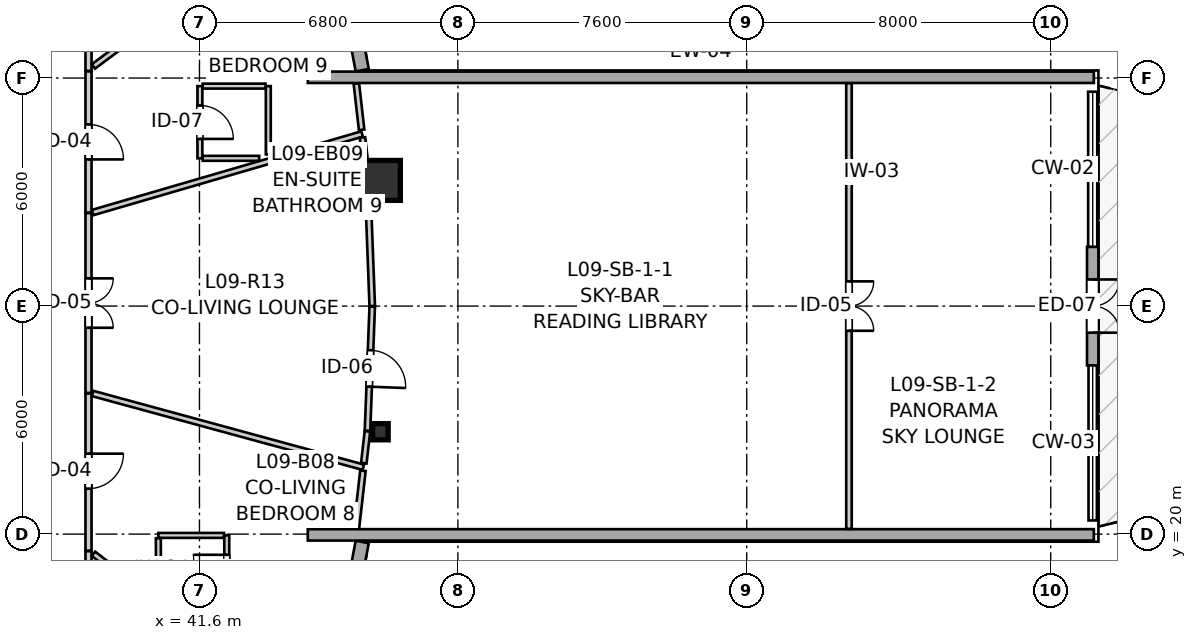
"""IFC4 building model, lengths in metres.
Left out: names, types, materials, properties, quantities, classifications, styles, units other than length and angle.
Written with IfcOpenShell. Run it as: python <this file> out.ifc"""

import sys

from ifc_helpers import new_model, si_unit, direction, frame, frame_2d, origin, origin_2d, place, context, subcontext, project, spatial, rectangle, i_section, extrude, source, transform, mapped, element, fill, save


model = new_model("IFC4")
c1 = context("Model", 3, precision=1e-05, world=origin(), true_north=direction((0.0, 1.0)))
c2 = subcontext(c1, "Body", "Model", "MODEL_VIEW")
j1 = project(units=[si_unit("LENGTHUNIT", "METRE"), si_unit("PLANEANGLEUNIT", "RADIAN")], contexts=[c1])
p1 = place(None, origin())
s1 = spatial("IfcSite", under=j1, at=p1, CompositionType="ELEMENT")
p2 = place(p1, origin())
s2 = spatial("IfcBuilding", under=s1, at=p2, CompositionType="ELEMENT")
p3 = place(p2, frame((0.0, 0.0, 33.4)))
s3 = spatial("IfcBuildingStorey", under=s2, at=p3, CompositionType="ELEMENT", Elevation=33.4)
m1 = source(origin(), c2, "Body", "SweptSolid", [
    extrude(i_section(OverallWidth=0.409, OverallDepth=0.425, WebThickness=0.03, FlangeThickness=0.048, FilletRadius=0.015, at=origin_2d()), origin(), (0.0, 0.0, 1.0), 2.94),
])
p4 = place(p3, frame((46.361, 22.694, 0.0), z_axis=(0.0, 0.0, 1.0), x_axis=(1.0, 0.0, 0.0)))
e1 = element("IfcColumn", 1, at=p4, inside=s3, PredefinedType="PILASTER", context=c2, shape_type="MappedRepresentation", body=[
    mapped(m1, transform((0.0, 0.0, 0.0), x_axis=(1.0, 0.0, 0.0), y_axis=(0.0, 1.0, 0.0), z_axis=(0.0, 0.0, 1.0), scale=1.0)),
])
m2 = source(origin(), c2, "Body", "SweptSolid", [
    extrude(rectangle(XDim=1.05, YDim=1.05, at=origin_2d()), origin(), (0.0, 0.0, 1.0), 2.94),
])
p5 = place(p3, frame((46.361, 29.306, 0.0), z_axis=(0.0, 0.0, 1.0), x_axis=(1.0, 0.0, 0.0)))
e2 = element("IfcColumn", 2, at=p5, inside=s3, PredefinedType="COLUMN", context=c2, shape_type="MappedRepresentation", body=[
    mapped(m2, transform((0.0, 0.0, 0.0), x_axis=(1.0, 0.0, 0.0), y_axis=(0.0, 1.0, 0.0), z_axis=(0.0, 0.0, 1.0), scale=1.0)),
])
p6 = place(p3, frame((45.24, 16.408, 0.0), z_axis=(0.0, 0.0, 1.0), x_axis=(0.186636709983, 0.982428999209, 0.0)))
e3 = element("IfcWall", 3, at=p6, inside=s3, PredefinedType="SOLIDWALL", context=c2, shape_type="SweptSolid", body=[
    extrude(rectangle(XDim=3.446, YDim=0.35, at=frame_2d((1.723, 0.0))), origin(), (0.0, 0.0, 1.0), 2.42),
])
p7 = place(p6, frame((0.828, 0.0, 0.82)))
e4 = element("IfcOpeningElement", 4, at=p7, cuts=e3, PredefinedType="OPENING", context=c2, shape_type="SweptSolid", body=[
    extrude(rectangle(XDim=1.45, YDim=1.25, at=frame_2d((0.725, 0.625))), frame((0.0, 0.185, 0.0), z_axis=(0.0, -1.0, 0.0), x_axis=(1.0, 0.0, 0.0)), (0.0, 0.0, 1.0), 0.37),
])
p8 = place(p3, frame((45.883, 32.207, 0.0), z_axis=(0.0, 0.0, 1.0), x_axis=(-0.186693533797, 0.982418202416, 0.0)))
e5 = element("IfcWall", 5, at=p8, inside=s3, PredefinedType="SOLIDWALL", context=c2, shape_type="SweptSolid", body=[
    extrude(rectangle(XDim=3.726, YDim=0.35, at=frame_2d((1.863, 0.0))), origin(), (0.0, 0.0, 1.0), 2.42),
])
p9 = place(p8, frame((1.313, 0.0, 0.82)))
e6 = element("IfcOpeningElement", 6, at=p9, cuts=e5, PredefinedType="OPENING", context=c2, shape_type="SweptSolid", body=[
    extrude(rectangle(XDim=1.45, YDim=1.25, at=frame_2d((0.725, 0.625))), frame((0.0, 0.185, 0.0), z_axis=(0.0, -1.0, 0.0), x_axis=(1.0, 0.0, 0.0)), (0.0, 0.0, 1.0), 0.37),
])
for number, where, z_axis, x_axis in (
    (7, (44.45, 32.02, 0.0), (0.0, 0.0, 1.0), (1.0, 0.0, 0.0)),
    (8, (44.45, 19.98, 0.0), (0.0, 0.0, 1.0), (1.0, 0.0, 0.0)),
):
    element("IfcWall", number, at=place(p3, frame(where, z_axis=z_axis, x_axis=x_axis)), inside=s3, PredefinedType="SOLIDWALL", context=c2, shape_type="SweptSolid", body=[
        extrude(rectangle(XDim=20.685, YDim=0.3, at=frame_2d((10.342, 0.0))), origin(), (0.0, 0.0, 1.0), 2.12),
    ])
p10 = place(p3, frame((65.104, 27.56, 0.0), z_axis=(0.0, 0.0, 1.0), x_axis=(0.0, -1.0, 0.0)))
e9 = element("IfcWall", 9, at=p10, inside=s3, PredefinedType="SOLIDWALL", context=c2, shape_type="SweptSolid", body=[
    extrude(rectangle(XDim=3.12, YDim=0.3, at=frame_2d((1.56, 0.0))), origin(), (0.0, 0.0, 1.0), 2.3),
])
p11 = place(p10, frame((0.86, 0.0, 0.0)))
e10 = element("IfcOpeningElement", 10, at=p11, cuts=e9, PredefinedType="OPENING", context=c2, shape_type="SweptSolid", body=[
    extrude(rectangle(XDim=1.4, YDim=2.15, at=frame_2d((0.7, 1.075))), frame((0.0, 0.16, 0.0), z_axis=(0.0, -1.0, 0.0), x_axis=(1.0, 0.0, 0.0)), (0.0, 0.0, 1.0), 0.32),
])
p12 = place(p3, frame((58.691, 31.862, 0.0), z_axis=(0.0, 0.0, 1.0), x_axis=(0.0, -1.0, 0.0)))
e11 = element("IfcWall", 11, at=p12, inside=s3, PredefinedType="PARTITIONING", context=c2, shape_type="SweptSolid", body=[
    extrude(rectangle(XDim=11.724, YDim=0.145, at=frame_2d((5.862, 0.0))), origin(), (0.0, 0.0, 1.0), 2.383),
])
p13 = place(p12, frame((5.212, 0.0, 0.0)))
e12 = element("IfcOpeningElement", 12, at=p13, cuts=e11, PredefinedType="OPENING", context=c2, shape_type="SweptSolid", body=[
    extrude(rectangle(XDim=1.3, YDim=2.1, at=frame_2d((0.65, 1.05))), frame((0.0, 0.083, 0.0), z_axis=(0.0, -1.0, 0.0), x_axis=(1.0, 0.0, 0.0)), (0.0, 0.0, 1.0), 0.165),
])
p14 = place(p3, frame((38.68, 28.445, 0.0), z_axis=(0.0, 0.0, 1.0), x_axis=(0.0, -1.0, 0.0)))
e13 = element("IfcWall", 13, at=p14, inside=s3, PredefinedType="PARTITIONING", context=c2, shape_type="SweptSolid", body=[
    extrude(rectangle(XDim=4.731, YDim=0.16, at=frame_2d((2.365, 0.0))), origin(), (0.0, 0.0, 1.0), 2.94),
])
p15 = place(p14, frame((1.716, 0.0, 0.0)))
e14 = element("IfcOpeningElement", 14, at=p15, cuts=e13, PredefinedType="OPENING", context=c2, shape_type="SweptSolid", body=[
    extrude(rectangle(XDim=1.3, YDim=2.1, at=frame_2d((0.65, 1.05))), frame((0.0, 0.09, 0.0), z_axis=(0.0, -1.0, 0.0), x_axis=(1.0, 0.0, 0.0)), (0.0, 0.0, 1.0), 0.18),
])
p16 = place(p3, frame((38.68, 36.58, 0.0), z_axis=(0.0, 0.0, 1.0), x_axis=(0.0, -1.0, 0.0)))
e15 = element("IfcWall", 15, at=p16, inside=s3, PredefinedType="PARTITIONING", context=c2, shape_type="SweptSolid", body=[
    extrude(rectangle(XDim=4.39, YDim=0.16, at=frame_2d((2.195, 0.0))), origin(), (0.0, 0.0, 1.0), 2.94),
])
p17 = place(p16, frame((1.726, 0.0, 0.0)))
e16 = element("IfcOpeningElement", 16, at=p17, cuts=e15, PredefinedType="OPENING", context=c2, shape_type="SweptSolid", body=[
    extrude(rectangle(XDim=0.92, YDim=2.1, at=frame_2d((0.46, 1.05))), frame((0.0, 0.09, 0.0), z_axis=(0.0, -1.0, 0.0), x_axis=(1.0, 0.0, 0.0)), (0.0, 0.0, 1.0), 0.18),
])
p18 = place(p3, frame((38.68, 23.699, 0.0), z_axis=(0.0, 0.0, 1.0), x_axis=(0.0, -1.0, 0.0)))
e17 = element("IfcWall", 17, at=p18, inside=s3, PredefinedType="PARTITIONING", context=c2, shape_type="SweptSolid", body=[
    extrude(rectangle(XDim=4.135, YDim=0.16, at=frame_2d((2.067, 0.0))), origin(), (0.0, 0.0, 1.0), 2.94),
])
p19 = place(p18, frame((1.583, 0.0, 0.0)))
e18 = element("IfcOpeningElement", 18, at=p19, cuts=e17, PredefinedType="OPENING", context=c2, shape_type="SweptSolid", body=[
    extrude(rectangle(XDim=0.92, YDim=2.1, at=frame_2d((0.46, 1.05))), frame((0.0, 0.09, 0.0), z_axis=(0.0, -1.0, 0.0), x_axis=(1.0, 0.0, 0.0)), (0.0, 0.0, 1.0), 0.18),
])
p20 = place(p3, frame((38.68, 32.175, 0.0), z_axis=(0.0, 0.0, 1.0), x_axis=(0.0, -1.0, 0.0)))
e19 = element("IfcWall", 19, at=p20, inside=s3, PredefinedType="PARTITIONING", context=c2, shape_type="SweptSolid", body=[
    extrude(rectangle(XDim=3.715, YDim=0.16, at=frame_2d((1.857, 0.0))), origin(), (0.0, 0.0, 1.0), 2.94),
])
p21 = place(p20, frame((1.396, 0.0, 0.0)))
e20 = element("IfcOpeningElement", 20, at=p21, cuts=e19, PredefinedType="OPENING", context=c2, shape_type="SweptSolid", body=[
    extrude(rectangle(XDim=0.92, YDim=2.1, at=frame_2d((0.46, 1.05))), frame((0.0, 0.09, 0.0), z_axis=(0.0, -1.0, 0.0), x_axis=(1.0, 0.0, 0.0)), (0.0, 0.0, 1.0), 0.18),
])
p22 = place(p3, frame((46.146, 25.985, 0.0), z_axis=(0.0, 0.0, 1.0), x_axis=(-0.038094618751, -0.999274136572, 0.0)))
e21 = element("IfcWall", 21, at=p22, inside=s3, PredefinedType="PARTITIONING", context=c2, shape_type="SweptSolid", body=[
    extrude(rectangle(XDim=3.269, YDim=0.145, at=frame_2d((1.634, 0.0))), origin(), (0.0, 0.0, 1.0), 2.408),
])
p23 = place(p22, frame((1.147, 0.0, 0.0)))
e22 = element("IfcOpeningElement", 22, at=p23, cuts=e21, PredefinedType="OPENING", context=c2, shape_type="SweptSolid", body=[
    extrude(rectangle(XDim=0.96, YDim=2.1, at=frame_2d((0.48, 1.05))), frame((0.0, 0.083, 0.0), z_axis=(0.0, -1.0, 0.0), x_axis=(1.0, 0.0, 0.0)), (0.0, 0.0, 1.0), 0.165),
])
p24 = place(p3, frame((38.68, 19.549, 0.0), z_axis=(0.0, 0.0, 1.0), x_axis=(0.0, -1.0, 0.0)))
e23 = element("IfcWall", 23, at=p24, inside=s3, PredefinedType="PARTITIONING", context=c2, shape_type="SweptSolid", body=[
    extrude(rectangle(XDim=2.331, YDim=0.16, at=frame_2d((1.166, 0.0))), origin(), (0.0, 0.0, 1.0), 2.94),
])
p25 = place(p24, frame((0.488, 0.0, 0.0)))
e24 = element("IfcOpeningElement", 24, at=p25, cuts=e23, PredefinedType="OPENING", context=c2, shape_type="SweptSolid", body=[
    extrude(rectangle(XDim=1.3, YDim=2.1, at=frame_2d((0.65, 1.05))), frame((0.0, 0.09, 0.0), z_axis=(0.0, -1.0, 0.0), x_axis=(1.0, 0.0, 0.0)), (0.0, 0.0, 1.0), 0.18),
])
p26 = place(p3, frame((42.318, 18.066, 0.0), z_axis=(0.0, 0.0, 1.0), x_axis=(0.0, 1.0, 0.0)))
e25 = element("IfcWall", 25, at=p26, inside=s3, PredefinedType="PARTITIONING", context=c2, shape_type="SweptSolid", body=[
    extrude(rectangle(XDim=1.9, YDim=0.13, at=frame_2d((0.95, 0.0))), origin(), (0.0, 0.0, 1.0), 2.94),
])
p27 = place(p26, frame((0.51, 0.0, 0.0)))
e26 = element("IfcOpeningElement", 26, at=p27, cuts=e25, PredefinedType="OPENING", context=c2, shape_type="SweptSolid", body=[
    extrude(rectangle(XDim=0.88, YDim=2.05, at=frame_2d((0.44, 1.025))), frame((0.0, 0.075, 0.0), z_axis=(0.0, -1.0, 0.0), x_axis=(1.0, 0.0, 0.0)), (0.0, 0.0, 1.0), 0.15),
])
p28 = place(p3, frame((41.611, 31.788, 0.0), z_axis=(0.0, 0.0, 1.0), x_axis=(0.0, -1.0, 0.0)))
e27 = element("IfcWall", 27, at=p28, inside=s3, PredefinedType="PARTITIONING", context=c2, shape_type="SweptSolid", body=[
    extrude(rectangle(XDim=1.9, YDim=0.13, at=frame_2d((0.95, 0.0))), origin(), (0.0, 0.0, 1.0), 2.94),
])
p29 = place(p28, frame((0.51, 0.0, 0.0)))
e28 = element("IfcOpeningElement", 28, at=p29, cuts=e27, PredefinedType="OPENING", context=c2, shape_type="SweptSolid", body=[
    extrude(rectangle(XDim=0.88, YDim=2.05, at=frame_2d((0.44, 1.025))), frame((0.0, 0.075, 0.0), z_axis=(0.0, -1.0, 0.0), x_axis=(1.0, 0.0, 0.0)), (0.0, 0.0, 1.0), 0.15),
])
p30 = place(p3, frame((38.81, 32.306, 0.0), z_axis=(0.0, 0.0, 1.0), x_axis=(0.801799720797, 0.597592844443, 0.0)))
e29 = element("IfcWall", 29, at=p30, inside=s3, PredefinedType="PARTITIONING", context=c2, shape_type="SweptSolid", body=[
    extrude(rectangle(XDim=7.424, YDim=0.145, at=frame_2d((3.712, 0.0))), origin(), (0.0, 0.0, 1.0), 2.94),
])
p31 = place(p3, frame((38.788, 28.46, 0.0), z_axis=(0.0, 0.0, 1.0), x_axis=(0.959983709987, 0.280055845432, 0.0)))
e30 = element("IfcWall", 30, at=p31, inside=s3, PredefinedType="PARTITIONING", context=c2, shape_type="SweptSolid", body=[
    extrude(rectangle(XDim=7.386, YDim=0.145, at=frame_2d((3.693, 0.0))), origin(), (0.0, 0.0, 1.0), 2.94),
])
p32 = place(p3, frame((38.787, 23.701, 0.0), z_axis=(0.0, 0.0, 1.0), x_axis=(0.964810342249, -0.262946769308, 0.0)))
e31 = element("IfcWall", 31, at=p32, inside=s3, PredefinedType="PARTITIONING", context=c2, shape_type="SweptSolid", body=[
    extrude(rectangle(XDim=7.385, YDim=0.145, at=frame_2d((3.692, 0.0))), origin(), (0.0, 0.0, 1.0), 2.94),
])
p33 = place(p3, frame((46.021, 29.281, 0.0), z_axis=(0.0, 0.0, 1.0), x_axis=(0.038070453861, -0.999275057501, 0.0)))
e32 = element("IfcWall", 32, at=p33, inside=s3, PredefinedType="PARTITIONING", context=c2, shape_type="SweptSolid", body=[
    extrude(rectangle(XDim=3.283, YDim=0.145, at=frame_2d((1.642, 0.0))), origin(), (0.0, 0.0, 1.0), 2.408),
])
p34 = place(p3, frame((38.811, 19.482, 0.0), z_axis=(0.0, 0.0, 1.0), x_axis=(0.792185877025, -0.61027988353, 0.0)))
e33 = element("IfcWall", 33, at=p34, inside=s3, PredefinedType="PARTITIONING", context=c2, shape_type="SweptSolid", body=[
    extrude(rectangle(XDim=2.156, YDim=0.145, at=frame_2d((1.078, 0.0))), origin(), (0.0, 0.0, 1.0), 2.94),
])
p35 = place(p3, frame((43.411, 29.99, 0.0), z_axis=(0.0, 0.0, 1.0), x_axis=(0.0, 1.0, 0.0)))
e34 = element("IfcWall", 34, at=p35, inside=s3, PredefinedType="PARTITIONING", context=c2, shape_type="SweptSolid", body=[
    extrude(rectangle(XDim=1.798, YDim=0.13, at=frame_2d((0.899, 0.0))), origin(), (0.0, 0.0, 1.0), 2.94),
])
p36 = place(p3, frame((41.684, 31.788, 0.0), z_axis=(0.0, 0.0, 1.0), x_axis=(1.0, 0.0, 0.0)))
e35 = element("IfcWall", 35, at=p36, inside=s3, PredefinedType="PARTITIONING", context=c2, shape_type="SweptSolid", body=[
    extrude(rectangle(XDim=1.654, YDim=0.13, at=frame_2d((0.827, 0.0))), origin(), (0.0, 0.0, 1.0), 2.108),
])
p37 = place(p3, frame((41.684, 29.888, 0.0), z_axis=(0.0, 0.0, 1.0), x_axis=(1.0, 0.0, 0.0)))
e36 = element("IfcWall", 36, at=p37, inside=s3, PredefinedType="PARTITIONING", context=c2, shape_type="SweptSolid", body=[
    extrude(rectangle(XDim=1.487, YDim=0.13, at=frame_2d((0.743, 0.0))), origin(), (0.0, 0.0, 1.0), 2.94),
])
p38 = place(p3, frame((40.518, 19.966, 0.0), z_axis=(0.0, 0.0, 1.0), x_axis=(1.0, 0.0, 0.0)))
e37 = element("IfcWall", 37, at=p38, inside=s3, PredefinedType="PARTITIONING", context=c2, shape_type="SweptSolid", body=[
    extrude(rectangle(XDim=1.727, YDim=0.13, at=frame_2d((0.864, 0.0))), origin(), (0.0, 0.0, 1.0), 2.108),
])
p39 = place(p3, frame((40.518, 18.317, 0.0), z_axis=(0.0, 0.0, 1.0), x_axis=(0.0, 1.0, 0.0)))
e38 = element("IfcWall", 38, at=p39, inside=s3, PredefinedType="PARTITIONING", context=c2, shape_type="SweptSolid", body=[
    extrude(rectangle(XDim=1.576, YDim=0.13, at=frame_2d((0.788, 0.0))), origin(), (0.0, 0.0, 1.0), 2.94),
])
p40 = place(p3, frame((45.729, 20.146, 0.0), z_axis=(0.0, 0.0, 1.0), x_axis=(0.113074294354, 0.993586535716, 0.0)))
e39 = element("IfcWall", 39, at=p40, inside=s3, PredefinedType="PARTITIONING", context=c2, shape_type="SweptSolid", body=[
    extrude(rectangle(XDim=1.531, YDim=0.145, at=frame_2d((0.765, 0.0))), origin(), (0.0, 0.0, 1.0), 2.408),
])
p41 = place(p3, frame((45.89, 30.436, 0.0), z_axis=(0.0, 0.0, 1.0), x_axis=(0.113024308153, -0.993592223081, 0.0)))
e40 = element("IfcWall", 40, at=p41, inside=s3, PredefinedType="PARTITIONING", context=c2, shape_type="SweptSolid", body=[
    extrude(rectangle(XDim=1.147, YDim=0.145, at=frame_2d((0.573, 0.0))), origin(), (0.0, 0.0, 1.0), 2.408),
])
p42 = place(p3, frame((45.729, 31.854, 0.0), z_axis=(0.0, 0.0, 1.0), x_axis=(0.112860473391, -0.993610846129, 0.0)))
e41 = element("IfcWall", 41, at=p42, inside=s3, PredefinedType="PARTITIONING", context=c2, shape_type="SweptSolid", body=[
    extrude(rectangle(XDim=1.224, YDim=0.145, at=frame_2d((0.612, 0.0))), origin(), (0.0, 0.0, 1.0), 2.408),
])
p43 = place(p3, frame((45.924, 21.866, 0.0), z_axis=(0.0, 0.0, 1.0), x_axis=(0.112844765803, 0.993612630169, 0.0)))
e42 = element("IfcWall", 42, at=p43, inside=s3, PredefinedType="PARTITIONING", context=c2, shape_type="SweptSolid", body=[
    extrude(rectangle(XDim=0.844, YDim=0.145, at=frame_2d((0.422, 0.0))), origin(), (0.0, 0.0, 1.0), 2.408),
])
m3 = source(origin(), c2, "Body", "SweptSolid", [
    extrude(rectangle(XDim=1.4, YDim=2.15, at=frame_2d((0.7, 1.075))), frame((0.0, 0.025, 0.0), z_axis=(0.0, -1.0, 0.0), x_axis=(1.0, 0.0, 0.0)), (0.0, 0.0, 1.0), 0.05),
])
p44 = place(p11, origin())
e43 = element("IfcDoor", 43, at=p44, inside=s3, OperationType="DOUBLE_DOOR_SINGLE_SWING", PredefinedType="DOOR", context=c2, shape_type="MappedRepresentation", body=[
    mapped(m3, transform((0.0, 0.0, 0.0), x_axis=(1.0, 0.0, 0.0), y_axis=(0.0, 1.0, 0.0), z_axis=(0.0, 0.0, 1.0), scale=1.0)),
])
fill(e10, e43)
m4 = source(origin(), c2, "Body", "SweptSolid", [
    extrude(rectangle(XDim=1.3, YDim=2.1, at=frame_2d((0.65, 1.05))), frame((0.0, 0.025, 0.0), z_axis=(0.0, -1.0, 0.0), x_axis=(1.0, 0.0, 0.0)), (0.0, 0.0, 1.0), 0.05),
])
p45 = place(p13, origin())
e44 = element("IfcDoor", 44, at=p45, inside=s3, OperationType="DOUBLE_DOOR_SINGLE_SWING", PredefinedType="DOOR", context=c2, shape_type="MappedRepresentation", body=[
    mapped(m4, transform((0.0, 0.0, 0.0), x_axis=(1.0, 0.0, 0.0), y_axis=(0.0, 1.0, 0.0), z_axis=(0.0, 0.0, 1.0), scale=1.0)),
])
fill(e12, e44)
p46 = place(p15, origin())
e45 = element("IfcDoor", 45, at=p46, inside=s3, OperationType="DOUBLE_DOOR_SINGLE_SWING", PredefinedType="DOOR", context=c2, shape_type="MappedRepresentation", body=[
    mapped(m4, transform((0.0, 0.0, 0.0), x_axis=(1.0, 0.0, 0.0), y_axis=(0.0, 1.0, 0.0), z_axis=(0.0, 0.0, 1.0), scale=1.0)),
])
fill(e14, e45)
m5 = source(origin(), c2, "Body", "SweptSolid", [
    extrude(rectangle(XDim=0.92, YDim=2.1, at=frame_2d((0.46, 1.05))), frame((0.0, 0.025, 0.0), z_axis=(0.0, -1.0, 0.0), x_axis=(1.0, 0.0, 0.0)), (0.0, 0.0, 1.0), 0.05),
])
p47 = place(p19, origin())
e46 = element("IfcDoor", 46, at=p47, inside=s3, OperationType="SINGLE_SWING_LEFT", PredefinedType="DOOR", context=c2, shape_type="MappedRepresentation", body=[
    mapped(m5, transform((0.0, 0.0, 0.0), x_axis=(1.0, 0.0, 0.0), y_axis=(0.0, 1.0, 0.0), z_axis=(0.0, 0.0, 1.0), scale=1.0)),
])
fill(e18, e46)
p48 = place(p21, origin())
e47 = element("IfcDoor", 47, at=p48, inside=s3, OperationType="SINGLE_SWING_RIGHT", PredefinedType="DOOR", context=c2, shape_type="MappedRepresentation", body=[
    mapped(m5, transform((0.0, 0.0, 0.0), x_axis=(1.0, 0.0, 0.0), y_axis=(0.0, 1.0, 0.0), z_axis=(0.0, 0.0, 1.0), scale=1.0)),
])
fill(e20, e47)
m6 = source(origin(), c2, "Body", "SweptSolid", [
    extrude(rectangle(XDim=0.96, YDim=2.1, at=frame_2d((0.48, 1.05))), frame((0.0, 0.025, 0.0), z_axis=(0.0, -1.0, 0.0), x_axis=(1.0, 0.0, 0.0)), (0.0, 0.0, 1.0), 0.05),
])
p49 = place(p23, origin())
e48 = element("IfcDoor", 48, at=p49, inside=s3, OperationType="SINGLE_SWING_RIGHT", PredefinedType="DOOR", context=c2, shape_type="MappedRepresentation", body=[
    mapped(m6, transform((0.0, 0.0, 0.0), x_axis=(1.0, 0.0, 0.0), y_axis=(0.0, 1.0, 0.0), z_axis=(0.0, 0.0, 1.0), scale=1.0)),
])
fill(e22, e48)
m7 = source(origin(), c2, "Body", "SweptSolid", [
    extrude(rectangle(XDim=0.88, YDim=2.05, at=frame_2d((0.44, 1.025))), frame((0.0, 0.025, 0.0), z_axis=(0.0, -1.0, 0.0), x_axis=(1.0, 0.0, 0.0)), (0.0, 0.0, 1.0), 0.05),
])
p50 = place(p27, origin())
e49 = element("IfcDoor", 49, at=p50, inside=s3, OperationType="SINGLE_SWING_RIGHT", PredefinedType="DOOR", context=c2, shape_type="MappedRepresentation", body=[
    mapped(m7, transform((0.0, 0.0, 0.0), x_axis=(1.0, 0.0, 0.0), y_axis=(0.0, 1.0, 0.0), z_axis=(0.0, 0.0, 1.0), scale=1.0)),
])
fill(e26, e49)
p51 = place(p29, origin())
e50 = element("IfcDoor", 50, at=p51, inside=s3, OperationType="SINGLE_SWING_RIGHT", PredefinedType="DOOR", context=c2, shape_type="MappedRepresentation", body=[
    mapped(m7, transform((0.0, 0.0, 0.0), x_axis=(1.0, 0.0, 0.0), y_axis=(0.0, 1.0, 0.0), z_axis=(0.0, 0.0, 1.0), scale=1.0)),
])
fill(e28, e50)
save(model, sys.argv[1])
